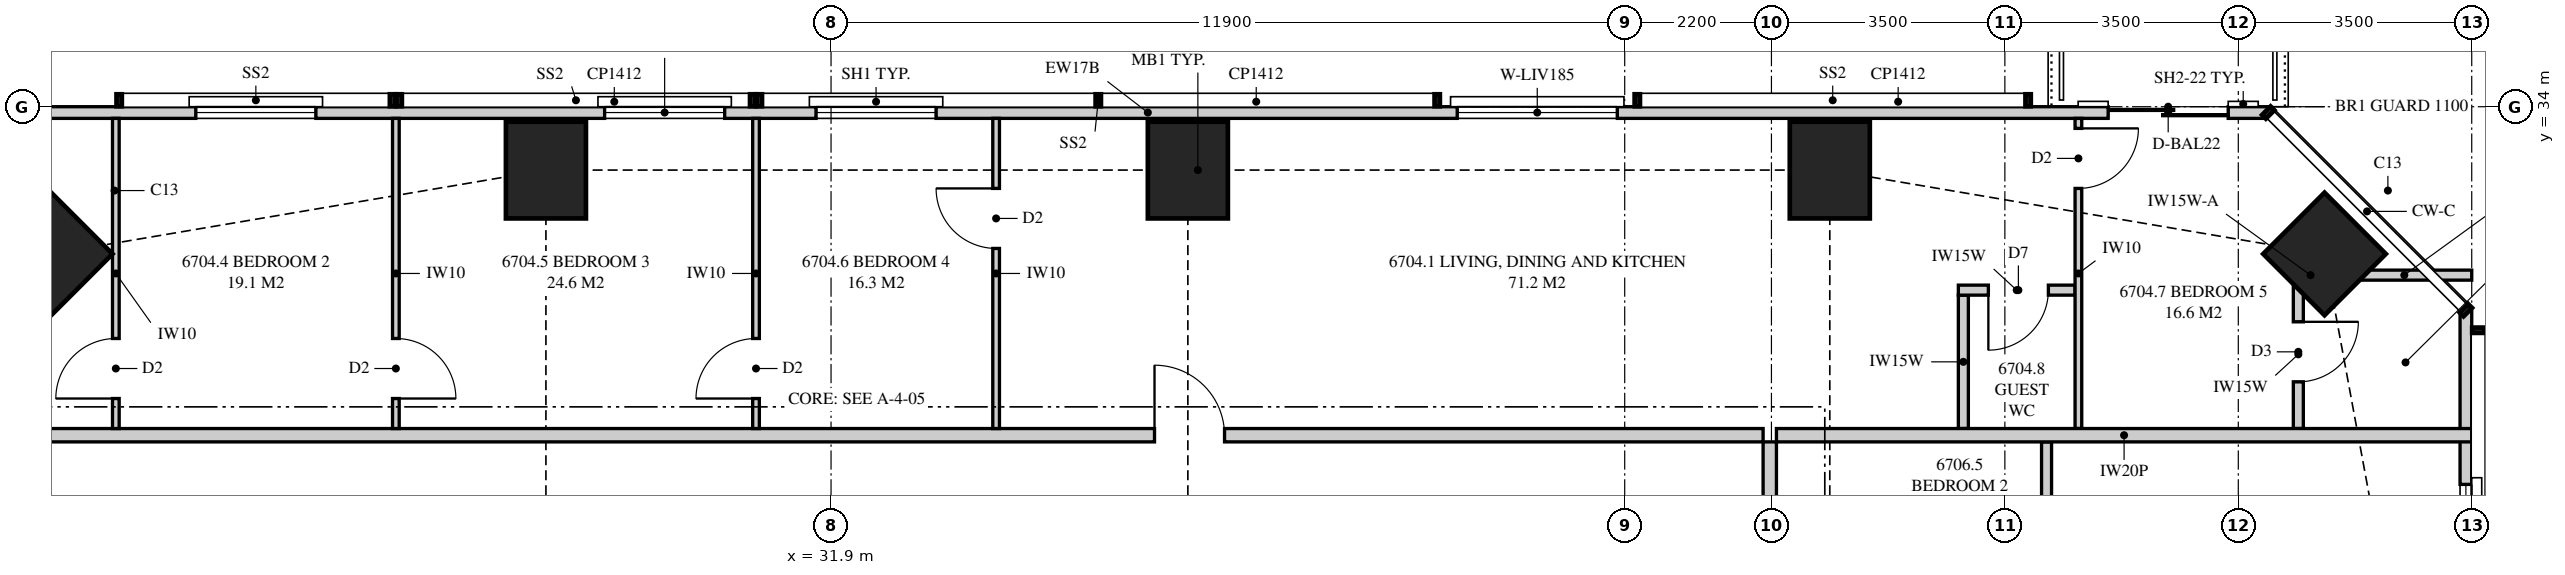
"""IFC4 building model, lengths in metres.
Left out: names, types, materials, properties, quantities, classifications, styles, units other than length and angle.
Written with IfcOpenShell. Run it as: python <this file> out.ifc"""

import sys

from ifc_helpers import new_model, si_unit, direction, frame, frame_2d, origin, origin_2d, place, context, subcontext, project, spatial, polyline, rectangle, outline, extrude, element, fill, save


model = new_model("IFC4")
c1 = context("Model", 3, precision=1e-05, world=origin(), true_north=direction((0.0, 1.0)))
c2 = subcontext(c1, "Body", "Model", "MODEL_VIEW")
j1 = project(units=[si_unit("LENGTHUNIT", "METRE"), si_unit("PLANEANGLEUNIT", "RADIAN")], contexts=[c1])
p1 = place(None, origin())
s1 = spatial("IfcSite", under=j1, at=p1, CompositionType="ELEMENT")
p2 = place(p1, origin())
s2 = spatial("IfcBuilding", under=s1, at=p2, CompositionType="ELEMENT")
p3 = place(p2, frame((0.0, 0.0, 245.95)))
s3 = spatial("IfcBuildingStorey", under=s2, at=p3, CompositionType="ELEMENT", Elevation=245.95)
p4 = place(p3, frame((54.293, 31.793, 0.0), z_axis=(0.0, 0.0, 1.0), x_axis=(0.707106781187, 0.707106781187, 0.0)))
e1 = element("IfcColumn", 1, at=p4, inside=s3, PredefinedType="COLUMN", context=c2, shape_type="SweptSolid", body=[
    extrude(rectangle(XDim=1.3, YDim=1.3, at=origin_2d()), origin(), (0.0, 0.0, 1.0), 3.5),
])
for number, where, z_axis, x_axis in (
    (2, (46.875, 33.05, 0.0), (0.0, 0.0, 1.0), (0.0, 1.0, 0.0)),
    (3, (37.25, 33.05, 0.0), (0.0, 0.0, 1.0), (0.0, 1.0, 0.0)),
    (4, (27.625, 33.05, 0.0), (0.0, 0.0, 1.0), (0.0, 1.0, 0.0)),
):
    element("IfcColumn", number, at=place(p3, frame(where, z_axis=z_axis, x_axis=x_axis)), inside=s3, PredefinedType="COLUMN", context=c2, shape_type="SweptSolid", body=[
        extrude(rectangle(XDim=1.45, YDim=1.2, at=origin_2d()), origin(), (0.0, 0.0, 1.0), 3.5),
    ])
p5 = place(p3, frame((20.207, 31.793, 0.0), z_axis=(0.0, 0.0, 1.0), x_axis=(0.707106781187, 0.707106781187, 0.0)))
e5 = element("IfcColumn", 5, at=p5, inside=s3, PredefinedType="COLUMN", context=c2, shape_type="SweptSolid", body=[
    extrude(rectangle(XDim=1.3, YDim=1.3, at=origin_2d()), origin(), (0.0, 0.0, 1.0), 3.5),
])
p6 = place(p3, frame((56.413, 20.55, 0.0), z_axis=(0.0, 0.0, 1.0), x_axis=(0.0, 1.0, 0.0)))
e6 = element("IfcWall", 6, at=p6, inside=s3, PredefinedType="SOLIDWALL", context=c2, shape_type="SweptSolid", body=[
    extrude(outline(polyline([(0.0, 0.0), (10.399, 0.0), (10.399, 3.26), (4.658, 3.26), (4.658, 2.3), (4.594, 2.3), (4.594, 3.26), (4.45, 3.26), (4.45, 2.3), (0.0, 2.3), (0.0, 0.0)])), frame((0.0, 0.087, 0.0), z_axis=(0.0, -1.0, 0.0), x_axis=(1.0, 0.0, 0.0)), (0.0, 0.0, 1.0), 0.175),
])
p7 = place(p6, frame((1.2, 0.0, 0.4)))
e7 = element("IfcOpeningElement", 7, at=p7, cuts=e6, PredefinedType="OPENING", context=c2, shape_type="SweptSolid", body=[
    extrude(rectangle(XDim=2.4, YDim=1.85, at=frame_2d((1.2, 0.925))), frame((0.0, 0.097, 0.0), z_axis=(0.0, -1.0, 0.0), x_axis=(1.0, 0.0, 0.0)), (0.0, 0.0, 1.0), 0.195),
])
p8 = place(p6, frame((5.988, 0.0, 0.4)))
e8 = element("IfcOpeningElement", 8, at=p8, cuts=e6, PredefinedType="OPENING", context=c2, shape_type="SweptSolid", body=[
    extrude(rectangle(XDim=1.8, YDim=1.85, at=frame_2d((0.9, 0.925))), frame((0.0, 0.097, 0.0), z_axis=(0.0, -1.0, 0.0), x_axis=(1.0, 0.0, 0.0)), (0.0, 0.0, 1.0), 0.195),
])
p9 = place(p3, frame((53.449, 33.913, 0.0), z_axis=(0.0, 0.0, 1.0), x_axis=(-1.0, 0.0, 0.0)))
e9 = element("IfcWall", 9, at=p9, inside=s3, PredefinedType="SOLIDWALL", context=c2, shape_type="SweptSolid", body=[
    extrude(outline(polyline([(0.0, 0.0), (33.597, 0.0), (33.597, 3.26), (26.039, 3.26), (26.039, 2.3), (25.955, 2.3), (25.955, 3.26), (25.824, 3.26), (25.824, 2.3), (6.574, 2.3), (6.574, 3.26), (6.442, 3.26), (6.442, 2.3), (6.359, 2.3), (6.359, 3.26), (0.0, 3.26), (0.0, 0.0)])), frame((0.0, 0.087, 0.0), z_axis=(0.0, -1.0, 0.0), x_axis=(1.0, 0.0, 0.0)), (0.0, 0.0, 1.0), 0.175),
])
p10 = place(p9, frame((0.6, 0.0, 0.0)))
e10 = element("IfcOpeningElement", 10, at=p10, cuts=e9, PredefinedType="OPENING", context=c2, shape_type="SweptSolid", body=[
    extrude(rectangle(XDim=1.8, YDim=2.25, at=frame_2d((0.9, 1.125))), frame((0.0, 0.097, 0.0), z_axis=(0.0, -1.0, 0.0), x_axis=(1.0, 0.0, 0.0)), (0.0, 0.0, 1.0), 0.195),
])
p11 = place(p9, frame((9.76, 0.0, 0.4)))
e11 = element("IfcOpeningElement", 11, at=p11, cuts=e9, PredefinedType="OPENING", context=c2, shape_type="SweptSolid", body=[
    extrude(rectangle(XDim=2.4, YDim=1.85, at=frame_2d((1.2, 0.925))), frame((0.0, 0.097, 0.0), z_axis=(0.0, -1.0, 0.0), x_axis=(1.0, 0.0, 0.0)), (0.0, 0.0, 1.0), 0.195),
])
p12 = place(p9, frame((19.974, 0.0, 0.4)))
e12 = element("IfcOpeningElement", 12, at=p12, cuts=e9, PredefinedType="OPENING", context=c2, shape_type="SweptSolid", body=[
    extrude(rectangle(XDim=1.8, YDim=1.85, at=frame_2d((0.9, 0.925))), frame((0.0, 0.097, 0.0), z_axis=(0.0, -1.0, 0.0), x_axis=(1.0, 0.0, 0.0)), (0.0, 0.0, 1.0), 0.195),
])
p13 = place(p9, frame((23.144, 0.0, 0.4)))
e13 = element("IfcOpeningElement", 13, at=p13, cuts=e9, PredefinedType="OPENING", context=c2, shape_type="SweptSolid", body=[
    extrude(rectangle(XDim=1.8, YDim=1.85, at=frame_2d((0.9, 0.925))), frame((0.0, 0.097, 0.0), z_axis=(0.0, -1.0, 0.0), x_axis=(1.0, 0.0, 0.0)), (0.0, 0.0, 1.0), 0.195),
])
p14 = place(p9, frame((29.273, 0.0, 0.4)))
e14 = element("IfcOpeningElement", 14, at=p14, cuts=e9, PredefinedType="OPENING", context=c2, shape_type="SweptSolid", body=[
    extrude(rectangle(XDim=1.8, YDim=1.85, at=frame_2d((0.9, 0.925))), frame((0.0, 0.097, 0.0), z_axis=(0.0, -1.0, 0.0), x_axis=(1.0, 0.0, 0.0)), (0.0, 0.0, 1.0), 0.195),
])
p15 = place(p3, frame((18.0, 29.075, 0.0), z_axis=(0.0, 0.0, 1.0), x_axis=(1.0, 0.0, 0.0)))
e15 = element("IfcWall", 15, at=p15, inside=s3, PredefinedType="PARTITIONING", context=c2, shape_type="SweptSolid", body=[
    extrude(outline(polyline([(0.0, 0.0), (27.875, 0.0), (27.875, 3.26), (27.875, 2.66), (27.565, 2.66), (27.565, 3.26), (20.56, 3.26), (20.56, 2.66), (17.94, 2.66), (17.94, 3.26), (10.935, 3.26), (10.935, 2.66), (8.315, 2.66), (8.315, 3.26), (2.192, 3.26), (2.192, 2.3), (0.256, 2.3), (0.256, 3.26), (0.0, 3.26), (0.0, 0.0)])), frame((0.0, 0.1, 0.0), z_axis=(0.0, -1.0, 0.0), x_axis=(1.0, 0.0, 0.0)), (0.0, 0.0, 1.0), 0.2),
])
p16 = place(p15, frame((18.75, 0.0, 0.0)))
e16 = element("IfcOpeningElement", 16, at=p16, cuts=e15, PredefinedType="OPENING", context=c2, shape_type="SweptSolid", body=[
    extrude(rectangle(XDim=1.05, YDim=2.2, at=frame_2d((0.525, 1.1))), frame((0.0, 0.11, 0.0), z_axis=(0.0, -1.0, 0.0), x_axis=(1.0, 0.0, 0.0)), (0.0, 0.0, 1.0), 0.22),
])
p17 = place(p3, frame((53.975, 31.475, 0.0), z_axis=(0.0, 0.0, 1.0), x_axis=(1.0, 0.0, 0.0)))
e17 = element("IfcWall", 17, at=p17, inside=s3, PredefinedType="PLUMBINGWALL", context=c2, shape_type="SweptSolid", body=[
    extrude(rectangle(XDim=0.217, YDim=0.15, at=frame_2d((0.108, 0.0))), origin(), (0.0, 0.0, 1.0), 2.3),
])
p18 = place(p3, frame((54.478, 31.475, 0.0), z_axis=(0.0, 0.0, 1.0), x_axis=(1.0, 0.0, 0.0)))
e18 = element("IfcWall", 18, at=p18, inside=s3, PredefinedType="PLUMBINGWALL", context=c2, shape_type="SweptSolid", body=[
    extrude(outline(polyline([(0.774, 3.26), (0.774, 2.3), (0.325, 2.3), (0.0, 1.15), (0.325, 0.0), (2.022, 0.0), (2.022, 3.26), (0.774, 3.26)])), frame((0.0, 0.075, 0.0), z_axis=(0.0, -1.0, 0.0), x_axis=(1.0, 0.0, 0.0)), (0.0, 0.0, 1.0), 0.15),
])
p19 = place(p3, frame((53.9, 31.4, 0.0), z_axis=(0.0, 0.0, 1.0), x_axis=(0.0, -1.0, 0.0)))
e19 = element("IfcWall", 19, at=p19, inside=s3, PredefinedType="PLUMBINGWALL", context=c2, shape_type="SweptSolid", body=[
    extrude(outline(polyline([(0.0, 0.0), (2.225, 0.0), (2.225, 3.26), (2.225, 2.3), (0.438, 2.3), (0.0, 2.3), (0.0, 3.26), (0.0, 0.0)])), frame((0.0, 0.075, 0.0), z_axis=(0.0, -1.0, 0.0), x_axis=(1.0, 0.0, 0.0)), (0.0, 0.0, 1.0), 0.15),
])
p20 = place(p19, frame((0.625, 0.0, 0.0)))
e20 = element("IfcOpeningElement", 20, at=p20, cuts=e19, PredefinedType="OPENING", context=c2, shape_type="SweptSolid", body=[
    extrude(rectangle(XDim=0.9, YDim=2.1, at=frame_2d((0.45, 1.05))), frame((0.0, 0.085, 0.0), z_axis=(0.0, -1.0, 0.0), x_axis=(1.0, 0.0, 0.0)), (0.0, 0.0, 1.0), 0.17),
])
p21 = place(p3, frame((21.176, 33.825, 0.0), z_axis=(0.0, 0.0, 1.0), x_axis=(0.0, -1.0, 0.0)))
e21 = element("IfcWall", 21, at=p21, inside=s3, PredefinedType="PARTITIONING", context=c2, shape_type="SweptSolid", body=[
    extrude(outline(polyline([(0.0, 0.0), (4.65, 0.0), (4.65, 3.26), (2.74, 3.26), (2.74, 2.3), (0.996, 2.3), (0.996, 3.26), (0.0, 3.26), (0.0, 0.0)])), frame((0.0, 0.05, 0.0), z_axis=(0.0, -1.0, 0.0), x_axis=(1.0, 0.0, 0.0)), (0.0, 0.0, 1.0), 0.1),
])
p22 = place(p21, frame((3.3, 0.0, 0.0)))
e22 = element("IfcOpeningElement", 22, at=p22, cuts=e21, PredefinedType="OPENING", context=c2, shape_type="SweptSolid", body=[
    extrude(rectangle(XDim=0.9, YDim=2.1, at=frame_2d((0.45, 1.05))), frame((0.0, 0.06, 0.0), z_axis=(0.0, -1.0, 0.0), x_axis=(1.0, 0.0, 0.0)), (0.0, 0.0, 1.0), 0.12),
])
p23 = place(p3, frame((25.375, 33.825, 0.0), z_axis=(0.0, 0.0, 1.0), x_axis=(0.0, -1.0, 0.0)))
e23 = element("IfcWall", 23, at=p23, inside=s3, PredefinedType="PARTITIONING", context=c2, shape_type="SweptSolid", body=[
    extrude(outline(polyline([(0.0, 0.0), (4.65, 0.0), (4.65, 3.26), (2.029, 3.26), (2.029, 2.3), (0.284, 2.3), (0.284, 3.26), (0.0, 3.26), (0.0, 0.0)])), frame((0.0, 0.05, 0.0), z_axis=(0.0, -1.0, 0.0), x_axis=(1.0, 0.0, 0.0)), (0.0, 0.0, 1.0), 0.1),
])
p24 = place(p23, frame((3.3, 0.0, 0.0)))
e24 = element("IfcOpeningElement", 24, at=p24, cuts=e23, PredefinedType="OPENING", context=c2, shape_type="SweptSolid", body=[
    extrude(rectangle(XDim=0.9, YDim=2.1, at=frame_2d((0.45, 1.05))), frame((0.0, 0.06, 0.0), z_axis=(0.0, -1.0, 0.0), x_axis=(1.0, 0.0, 0.0)), (0.0, 0.0, 1.0), 0.12),
])
p25 = place(p3, frame((30.775, 33.825, 0.0), z_axis=(0.0, 0.0, 1.0), x_axis=(0.0, -1.0, 0.0)))
e25 = element("IfcWall", 25, at=p25, inside=s3, PredefinedType="PARTITIONING", context=c2, shape_type="SweptSolid", body=[
    extrude(outline(polyline([(0.0, 0.0), (4.65, 0.0), (4.65, 3.26), (1.635, 3.26), (1.635, 2.3), (0.0, 2.3), (0.0, 3.26), (0.0, 0.0)])), frame((0.0, 0.05, 0.0), z_axis=(0.0, -1.0, 0.0), x_axis=(1.0, 0.0, 0.0)), (0.0, 0.0, 1.0), 0.1),
])
p26 = place(p25, frame((3.3, 0.0, 0.0)))
e26 = element("IfcOpeningElement", 26, at=p26, cuts=e25, PredefinedType="OPENING", context=c2, shape_type="SweptSolid", body=[
    extrude(rectangle(XDim=0.9, YDim=2.1, at=frame_2d((0.45, 1.05))), frame((0.0, 0.06, 0.0), z_axis=(0.0, -1.0, 0.0), x_axis=(1.0, 0.0, 0.0)), (0.0, 0.0, 1.0), 0.12),
])
p27 = place(p3, frame((34.375, 33.825, 0.0), z_axis=(0.0, 0.0, 1.0), x_axis=(0.0, -1.0, 0.0)))
e27 = element("IfcWall", 27, at=p27, inside=s3, PredefinedType="PARTITIONING", context=c2, shape_type="SweptSolid", body=[
    extrude(outline(polyline([(0.0, 0.0), (4.65, 0.0), (4.65, 3.26), (1.635, 3.26), (1.635, 2.3), (0.0, 2.3), (0.0, 3.26), (0.0, 0.0)])), frame((0.0, 0.05, 0.0), z_axis=(0.0, -1.0, 0.0), x_axis=(1.0, 0.0, 0.0)), (0.0, 0.0, 1.0), 0.1),
])
p28 = place(p27, frame((1.05, 0.0, 0.0)))
e28 = element("IfcOpeningElement", 28, at=p28, cuts=e27, PredefinedType="OPENING", context=c2, shape_type="SweptSolid", body=[
    extrude(rectangle(XDim=0.9, YDim=2.1, at=frame_2d((0.45, 1.05))), frame((0.0, 0.06, 0.0), z_axis=(0.0, -1.0, 0.0), x_axis=(1.0, 0.0, 0.0)), (0.0, 0.0, 1.0), 0.12),
])
p29 = place(p3, frame((50.603, 33.825, 0.0), z_axis=(0.0, 0.0, 1.0), x_axis=(0.0, -1.0, 0.0)))
e29 = element("IfcWall", 29, at=p29, inside=s3, PredefinedType="PARTITIONING", context=c2, shape_type="SweptSolid", body=[
    extrude(outline(polyline([(0.0, 0.0), (4.65, 0.0), (4.65, 3.26), (2.279, 3.26), (2.279, 2.3), (0.534, 2.3), (0.534, 3.26), (0.0, 3.26), (0.0, 0.0)])), frame((0.0, 0.05, 0.0), z_axis=(0.0, -1.0, 0.0), x_axis=(1.0, 0.0, 0.0)), (0.0, 0.0, 1.0), 0.1),
])
p30 = place(p29, frame((0.15, 0.0, 0.0)))
e30 = element("IfcOpeningElement", 30, at=p30, cuts=e29, PredefinedType="OPENING", context=c2, shape_type="SweptSolid", body=[
    extrude(rectangle(XDim=0.9, YDim=2.1, at=frame_2d((0.45, 1.05))), frame((0.0, 0.06, 0.0), z_axis=(0.0, -1.0, 0.0), x_axis=(1.0, 0.0, 0.0)), (0.0, 0.0, 1.0), 0.12),
])
p31 = place(p3, frame((46.075, 29.075, 0.0), z_axis=(0.0, 0.0, 1.0), x_axis=(1.0, 0.0, 0.0)))
e31 = element("IfcWall", 31, at=p31, inside=s3, PredefinedType="PARTITIONING", context=c2, shape_type="SweptSolid", body=[
    extrude(outline(polyline([(0.0, 0.0), (10.425, 0.0), (10.425, 3.26), (9.646, 3.26), (9.646, 2.3), (7.795, 2.3), (7.795, 3.26), (2.11, 3.26), (2.11, 2.66), (0.0, 2.66), (0.0, 3.26), (0.0, 0.0)])), frame((0.0, 0.1, 0.0), z_axis=(0.0, -1.0, 0.0), x_axis=(1.0, 0.0, 0.0)), (0.0, 0.0, 1.0), 0.2),
])
p32 = place(p3, frame((45.975, 25.0, 0.0), z_axis=(0.0, 0.0, 1.0), x_axis=(0.0, 1.0, 0.0)))
e32 = element("IfcWall", 32, at=p32, inside=s3, PredefinedType="PARTITIONING", context=c2, shape_type="SweptSolid", body=[
    extrude(rectangle(XDim=3.975, YDim=0.2, at=frame_2d((1.988, 0.0))), origin(), (0.0, 0.0, 1.0), 2.66),
])
p33 = place(p3, frame((50.125, 25.85, 0.0), z_axis=(0.0, 0.0, 1.0), x_axis=(0.0, 1.0, 0.0)))
e33 = element("IfcWall", 33, at=p33, inside=s3, PredefinedType="PLUMBINGWALL", context=c2, shape_type="SweptSolid", body=[
    extrude(outline(polyline([(0.0, 0.0), (3.125, 0.0), (3.125, 3.26), (0.435, 3.26), (0.435, 2.66), (0.0, 2.66), (0.0, 3.26), (0.0, 0.0)])), frame((0.0, 0.075, 0.0), z_axis=(0.0, -1.0, 0.0), x_axis=(1.0, 0.0, 0.0)), (0.0, 0.0, 1.0), 0.15),
])
p34 = place(p33, frame((0.4, 0.0, 0.0)))
e34 = element("IfcOpeningElement", 34, at=p34, cuts=e33, PredefinedType="OPENING", context=c2, shape_type="SweptSolid", body=[
    extrude(rectangle(XDim=0.9, YDim=2.1, at=frame_2d((0.45, 1.05))), frame((0.0, 0.085, 0.0), z_axis=(0.0, -1.0, 0.0), x_axis=(1.0, 0.0, 0.0)), (0.0, 0.0, 1.0), 0.17),
])
p35 = place(p3, frame((50.552, 31.25, 0.0), z_axis=(0.0, 0.0, 1.0), x_axis=(-1.0, 0.0, 0.0)))
e35 = element("IfcWall", 35, at=p35, inside=s3, PredefinedType="PLUMBINGWALL", context=c2, shape_type="SweptSolid", body=[
    extrude(rectangle(XDim=1.75, YDim=0.15, at=frame_2d((0.875, 0.0))), origin(), (0.0, 0.0, 1.0), 3.26),
])
p36 = place(p35, frame((0.4, 0.0, 0.0)))
e36 = element("IfcOpeningElement", 36, at=p36, cuts=e35, PredefinedType="OPENING", context=c2, shape_type="SweptSolid", body=[
    extrude(rectangle(XDim=0.9, YDim=2.1, at=frame_2d((0.45, 1.05))), frame((0.0, 0.085, 0.0), z_axis=(0.0, -1.0, 0.0), x_axis=(1.0, 0.0, 0.0)), (0.0, 0.0, 1.0), 0.17),
])
p37 = place(p3, frame((48.877, 29.175, 0.0), z_axis=(0.0, 0.0, 1.0), x_axis=(0.0, 1.0, 0.0)))
e37 = element("IfcWall", 37, at=p37, inside=s3, PredefinedType="PLUMBINGWALL", context=c2, shape_type="SweptSolid", body=[
    extrude(rectangle(XDim=2.0, YDim=0.15, at=frame_2d((1.0, 0.0))), origin(), (0.0, 0.0, 1.0), 3.26),
])
p38 = place(p8, origin())
e38 = element("IfcWindow", 38, at=p38, inside=s3, PartitioningType="SINGLE_PANEL", PredefinedType="WINDOW", context=c2, shape_type="SweptSolid", body=[
    extrude(rectangle(XDim=1.8, YDim=1.85, at=frame_2d((0.9, 0.925))), frame((0.0, 0.03, 0.0), z_axis=(0.0, -1.0, 0.0), x_axis=(1.0, 0.0, 0.0)), (0.0, 0.0, 1.0), 0.06),
])
fill(e8, e38)
p39 = place(p10, origin())
e39 = element("IfcDoor", 39, at=p39, inside=s3, OperationType="SLIDING_TO_LEFT", PredefinedType="DOOR", context=c2, shape_type="SweptSolid", body=[
    extrude(rectangle(XDim=1.8, YDim=2.25, at=frame_2d((0.9, 1.125))), frame((0.0, 0.025, 0.0), z_axis=(0.0, -1.0, 0.0), x_axis=(1.0, 0.0, 0.0)), (0.0, 0.0, 1.0), 0.05),
])
fill(e10, e39)
p40 = place(p11, origin())
e40 = element("IfcWindow", 40, at=p40, inside=s3, PartitioningType="SINGLE_PANEL", PredefinedType="WINDOW", context=c2, shape_type="SweptSolid", body=[
    extrude(rectangle(XDim=2.4, YDim=1.85, at=frame_2d((1.2, 0.925))), frame((0.0, 0.03, 0.0), z_axis=(0.0, -1.0, 0.0), x_axis=(1.0, 0.0, 0.0)), (0.0, 0.0, 1.0), 0.06),
])
fill(e11, e40)
p41 = place(p12, origin())
e41 = element("IfcWindow", 41, at=p41, inside=s3, PartitioningType="SINGLE_PANEL", PredefinedType="WINDOW", context=c2, shape_type="SweptSolid", body=[
    extrude(rectangle(XDim=1.8, YDim=1.85, at=frame_2d((0.9, 0.925))), frame((0.0, 0.03, 0.0), z_axis=(0.0, -1.0, 0.0), x_axis=(1.0, 0.0, 0.0)), (0.0, 0.0, 1.0), 0.06),
])
fill(e12, e41)
p42 = place(p13, origin())
e42 = element("IfcWindow", 42, at=p42, inside=s3, PartitioningType="SINGLE_PANEL", PredefinedType="WINDOW", context=c2, shape_type="SweptSolid", body=[
    extrude(rectangle(XDim=1.8, YDim=1.85, at=frame_2d((0.9, 0.925))), frame((0.0, 0.03, 0.0), z_axis=(0.0, -1.0, 0.0), x_axis=(1.0, 0.0, 0.0)), (0.0, 0.0, 1.0), 0.06),
])
fill(e13, e42)
p43 = place(p14, origin())
e43 = element("IfcWindow", 43, at=p43, inside=s3, PartitioningType="SINGLE_PANEL", PredefinedType="WINDOW", context=c2, shape_type="SweptSolid", body=[
    extrude(rectangle(XDim=1.8, YDim=1.85, at=frame_2d((0.9, 0.925))), frame((0.0, 0.03, 0.0), z_axis=(0.0, -1.0, 0.0), x_axis=(1.0, 0.0, 0.0)), (0.0, 0.0, 1.0), 0.06),
])
fill(e14, e43)
p44 = place(p16, origin())
e44 = element("IfcDoor", 44, at=p44, inside=s3, OperationType="SINGLE_SWING_LEFT", PredefinedType="DOOR", context=c2, shape_type="SweptSolid", body=[
    extrude(rectangle(XDim=1.05, YDim=2.2, at=frame_2d((0.525, 1.1))), frame((0.0, 0.025, 0.0), z_axis=(0.0, -1.0, 0.0), x_axis=(1.0, 0.0, 0.0)), (0.0, 0.0, 1.0), 0.05),
])
fill(e16, e44)
p45 = place(p20, origin())
e45 = element("IfcDoor", 45, at=p45, inside=s3, OperationType="SINGLE_SWING_LEFT", PredefinedType="DOOR", context=c2, shape_type="SweptSolid", body=[
    extrude(rectangle(XDim=0.9, YDim=2.1, at=frame_2d((0.45, 1.05))), frame((0.0, 0.025, 0.0), z_axis=(0.0, -1.0, 0.0), x_axis=(1.0, 0.0, 0.0)), (0.0, 0.0, 1.0), 0.05),
])
fill(e20, e45)
p46 = place(p22, frame((0.9, 0.0, 0.0), z_axis=(0.0, 0.0, 1.0), x_axis=(-1.0, 0.0, 0.0)))
e46 = element("IfcDoor", 46, at=p46, inside=s3, OperationType="SINGLE_SWING_LEFT", PredefinedType="DOOR", context=c2, shape_type="SweptSolid", body=[
    extrude(rectangle(XDim=0.9, YDim=2.1, at=frame_2d((0.45, 1.05))), frame((0.0, 0.025, 0.0), z_axis=(0.0, -1.0, 0.0), x_axis=(1.0, 0.0, 0.0)), (0.0, 0.0, 1.0), 0.05),
])
fill(e22, e46)
p47 = place(p24, origin())
e47 = element("IfcDoor", 47, at=p47, inside=s3, OperationType="SINGLE_SWING_RIGHT", PredefinedType="DOOR", context=c2, shape_type="SweptSolid", body=[
    extrude(rectangle(XDim=0.9, YDim=2.1, at=frame_2d((0.45, 1.05))), frame((0.0, 0.025, 0.0), z_axis=(0.0, -1.0, 0.0), x_axis=(1.0, 0.0, 0.0)), (0.0, 0.0, 1.0), 0.05),
])
fill(e24, e47)
p48 = place(p26, frame((0.9, 0.0, 0.0), z_axis=(0.0, 0.0, 1.0), x_axis=(-1.0, 0.0, 0.0)))
e48 = element("IfcDoor", 48, at=p48, inside=s3, OperationType="SINGLE_SWING_LEFT", PredefinedType="DOOR", context=c2, shape_type="SweptSolid", body=[
    extrude(rectangle(XDim=0.9, YDim=2.1, at=frame_2d((0.45, 1.05))), frame((0.0, 0.025, 0.0), z_axis=(0.0, -1.0, 0.0), x_axis=(1.0, 0.0, 0.0)), (0.0, 0.0, 1.0), 0.05),
])
fill(e26, e48)
p49 = place(p28, frame((0.9, 0.0, 0.0), z_axis=(0.0, 0.0, 1.0), x_axis=(-1.0, 0.0, 0.0)))
e49 = element("IfcDoor", 49, at=p49, inside=s3, OperationType="SINGLE_SWING_RIGHT", PredefinedType="DOOR", context=c2, shape_type="SweptSolid", body=[
    extrude(rectangle(XDim=0.9, YDim=2.1, at=frame_2d((0.45, 1.05))), frame((0.0, 0.025, 0.0), z_axis=(0.0, -1.0, 0.0), x_axis=(1.0, 0.0, 0.0)), (0.0, 0.0, 1.0), 0.05),
])
fill(e28, e49)
p50 = place(p30, origin())
e50 = element("IfcDoor", 50, at=p50, inside=s3, OperationType="SINGLE_SWING_LEFT", PredefinedType="DOOR", context=c2, shape_type="SweptSolid", body=[
    extrude(rectangle(XDim=0.9, YDim=2.1, at=frame_2d((0.45, 1.05))), frame((0.0, 0.025, 0.0), z_axis=(0.0, -1.0, 0.0), x_axis=(1.0, 0.0, 0.0)), (0.0, 0.0, 1.0), 0.05),
])
fill(e30, e50)
p51 = place(p36, origin())
e51 = element("IfcDoor", 51, at=p51, inside=s3, OperationType="SINGLE_SWING_RIGHT", PredefinedType="DOOR", context=c2, shape_type="SweptSolid", body=[
    extrude(rectangle(XDim=0.9, YDim=2.1, at=frame_2d((0.45, 1.05))), frame((0.0, 0.025, 0.0), z_axis=(0.0, -1.0, 0.0), x_axis=(1.0, 0.0, 0.0)), (0.0, 0.0, 1.0), 0.05),
])
fill(e36, e51)
save(model, sys.argv[1])
